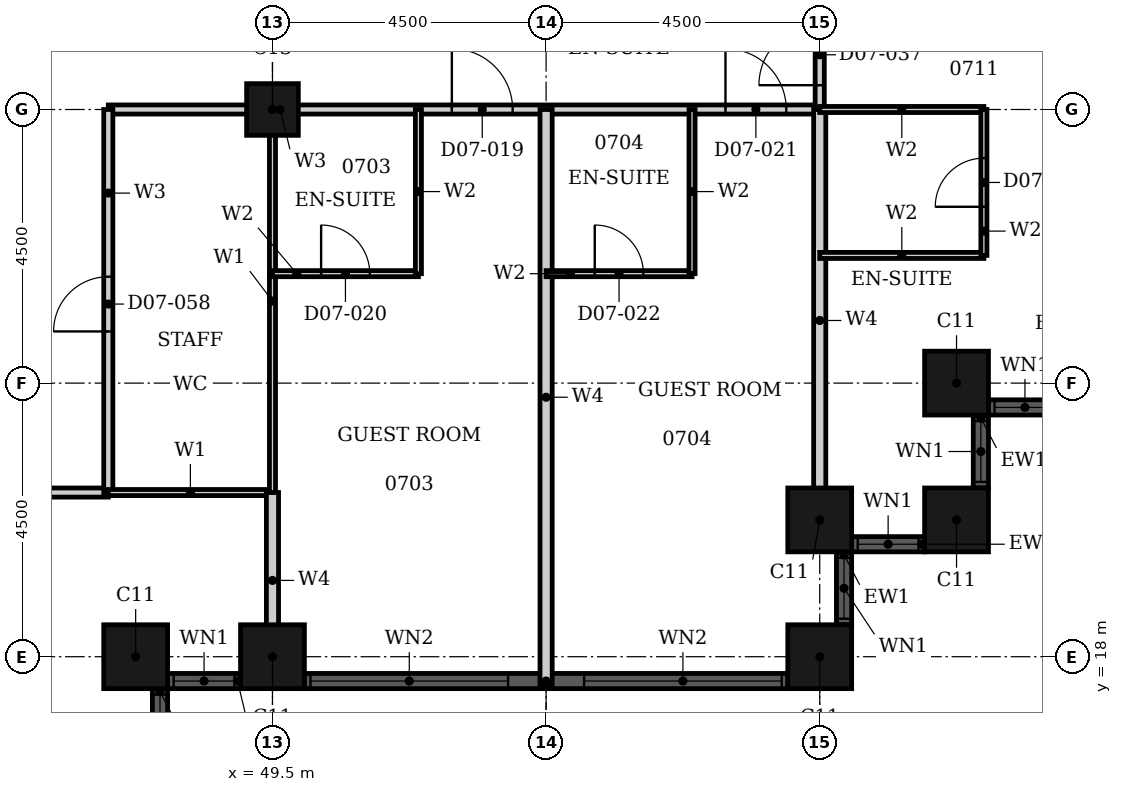
"""IFC4 building model, lengths in metres.
Left out: names, types, materials, properties, quantities, classifications, styles, units other than length and angle.
Written with IfcOpenShell. Run it as: python <this file> out.ifc"""

import sys

from ifc_helpers import new_model, si_unit, direction, frame, frame_2d, origin, origin_2d, place, context, subcontext, project, spatial, rectangle, hollow_rectangle, extrude, element, fill, save


model = new_model("IFC4")
c1 = context("Model", 3, precision=1e-05, world=origin(), true_north=direction((0.0, 1.0)))
c2 = subcontext(c1, "Body", "Model", "MODEL_VIEW")
j1 = project(units=[si_unit("LENGTHUNIT", "METRE"), si_unit("PLANEANGLEUNIT", "RADIAN")], contexts=[c1])
p1 = place(None, origin())
s1 = spatial("IfcSite", under=j1, at=p1, CompositionType="ELEMENT")
p2 = place(p1, origin())
s2 = spatial("IfcBuilding", under=s1, at=p2, CompositionType="ELEMENT")
p3 = place(p2, frame((0.0, 0.0, 37.2)))
s3 = spatial("IfcBuildingStorey", under=s2, at=p3, CompositionType="ELEMENT", Elevation=37.2)
for number, where, z_axis, x_axis in (
    (1, (47.25, 18.0, 0.0), (0.0, 0.0, 1.0), (1.0, 0.0, 0.0)),
    (2, (49.5, 18.0, 0.0), (0.0, 0.0, 1.0), (1.0, 0.0, 0.0)),
    (3, (58.5, 18.0, 0.0), (0.0, 0.0, 1.0), (1.0, 0.0, 0.0)),
    (4, (58.5, 20.25, 0.0), (0.0, 0.0, 1.0), (1.0, 0.0, 0.0)),
    (5, (60.75, 20.25, 0.0), (0.0, 0.0, 1.0), (1.0, 0.0, 0.0)),
    (6, (60.75, 22.5, 0.0), (0.0, 0.0, 1.0), (1.0, 0.0, 0.0)),
):
    element("IfcColumn", number, at=place(p3, frame(where, z_axis=z_axis, x_axis=x_axis)), inside=s3, PredefinedType="COLUMN", context=c2, shape_type="SweptSolid", body=[
        extrude(hollow_rectangle(XDim=1.05, YDim=1.05, WallThickness=0.034, at=origin_2d()), origin(), (0.0, 0.0, 1.0), 3.6),
    ])
p4 = place(p3, frame((49.5, 27.0, 0.0), z_axis=(0.0, 0.0, 1.0), x_axis=(1.0, 0.0, 0.0)))
e7 = element("IfcColumn", 7, at=p4, inside=s3, PredefinedType="COLUMN", context=c2, shape_type="SweptSolid", body=[
    extrude(hollow_rectangle(XDim=0.85, YDim=0.85, WallThickness=0.026, at=origin_2d()), origin(), (0.0, 0.0, 1.0), 3.6),
])
p5 = place(p3, frame((47.65, 16.275, 0.0), z_axis=(0.0, 0.0, 1.0), x_axis=(0.0, 1.0, 0.0)))
e8 = element("IfcWall", 8, at=p5, inside=s3, PredefinedType="SOLIDWALL", context=c2, shape_type="SweptSolid", body=[
    extrude(rectangle(XDim=1.2, YDim=0.25, at=frame_2d((0.6, 0.0))), origin(), (0.0, 0.0, 1.0), 3.6),
])
p6 = place(p5, frame((0.1, 0.0, 0.9)))
e9 = element("IfcOpeningElement", 9, at=p6, cuts=e8, PredefinedType="OPENING", context=c2, shape_type="SweptSolid", body=[
    extrude(rectangle(XDim=1.0, YDim=2.08, at=frame_2d((0.5, 1.04))), frame((0.0, 0.135, 0.0), z_axis=(0.0, -1.0, 0.0), x_axis=(1.0, 0.0, 0.0)), (0.0, 0.0, 1.0), 0.27),
])
p7 = place(p3, frame((47.775, 17.6, 0.0), z_axis=(0.0, 0.0, 1.0), x_axis=(1.0, 0.0, 0.0)))
e10 = element("IfcWall", 10, at=p7, inside=s3, PredefinedType="SOLIDWALL", context=c2, shape_type="SweptSolid", body=[
    extrude(rectangle(XDim=1.2, YDim=0.25, at=frame_2d((0.6, 0.0))), origin(), (0.0, 0.0, 1.0), 3.6),
])
p8 = place(p7, frame((0.1, 0.0, 0.9)))
e11 = element("IfcOpeningElement", 11, at=p8, cuts=e10, PredefinedType="OPENING", context=c2, shape_type="SweptSolid", body=[
    extrude(rectangle(XDim=1.0, YDim=2.08, at=frame_2d((0.5, 1.04))), frame((0.0, 0.135, 0.0), z_axis=(0.0, -1.0, 0.0), x_axis=(1.0, 0.0, 0.0)), (0.0, 0.0, 1.0), 0.27),
])
p9 = place(p3, frame((50.025, 17.6, 0.0), z_axis=(0.0, 0.0, 1.0), x_axis=(1.0, 0.0, 0.0)))
e12 = element("IfcWall", 12, at=p9, inside=s3, PredefinedType="SOLIDWALL", context=c2, shape_type="SweptSolid", body=[
    extrude(rectangle(XDim=7.95, YDim=0.25, at=frame_2d((3.975, 0.0))), origin(), (0.0, 0.0, 1.0), 3.6),
])
p10 = place(p9, frame((0.1, 0.0, 0.9)))
e13 = element("IfcOpeningElement", 13, at=p10, cuts=e12, PredefinedType="OPENING", context=c2, shape_type="SweptSolid", body=[
    extrude(rectangle(XDim=3.25, YDim=2.08, at=frame_2d((1.625, 1.04))), frame((0.0, 0.135, 0.0), z_axis=(0.0, -1.0, 0.0), x_axis=(1.0, 0.0, 0.0)), (0.0, 0.0, 1.0), 0.27),
])
p11 = place(p9, frame((4.6, 0.0, 0.9)))
e14 = element("IfcOpeningElement", 14, at=p11, cuts=e12, PredefinedType="OPENING", context=c2, shape_type="SweptSolid", body=[
    extrude(rectangle(XDim=3.25, YDim=2.08, at=frame_2d((1.625, 1.04))), frame((0.0, 0.135, 0.0), z_axis=(0.0, -1.0, 0.0), x_axis=(1.0, 0.0, 0.0)), (0.0, 0.0, 1.0), 0.27),
])
p12 = place(p3, frame((58.9, 18.525, 0.0), z_axis=(0.0, 0.0, 1.0), x_axis=(0.0, 1.0, 0.0)))
e15 = element("IfcWall", 15, at=p12, inside=s3, PredefinedType="SOLIDWALL", context=c2, shape_type="SweptSolid", body=[
    extrude(rectangle(XDim=1.2, YDim=0.25, at=frame_2d((0.6, 0.0))), origin(), (0.0, 0.0, 1.0), 3.6),
])
p13 = place(p12, frame((0.1, 0.0, 0.9)))
e16 = element("IfcOpeningElement", 16, at=p13, cuts=e15, PredefinedType="OPENING", context=c2, shape_type="SweptSolid", body=[
    extrude(rectangle(XDim=1.0, YDim=2.08, at=frame_2d((0.5, 1.04))), frame((0.0, 0.135, 0.0), z_axis=(0.0, -1.0, 0.0), x_axis=(1.0, 0.0, 0.0)), (0.0, 0.0, 1.0), 0.27),
])
p14 = place(p3, frame((59.025, 19.85, 0.0), z_axis=(0.0, 0.0, 1.0), x_axis=(1.0, 0.0, 0.0)))
e17 = element("IfcWall", 17, at=p14, inside=s3, PredefinedType="SOLIDWALL", context=c2, shape_type="SweptSolid", body=[
    extrude(rectangle(XDim=1.2, YDim=0.25, at=frame_2d((0.6, 0.0))), origin(), (0.0, 0.0, 1.0), 3.6),
])
p15 = place(p14, frame((0.1, 0.0, 0.9)))
e18 = element("IfcOpeningElement", 18, at=p15, cuts=e17, PredefinedType="OPENING", context=c2, shape_type="SweptSolid", body=[
    extrude(rectangle(XDim=1.0, YDim=2.08, at=frame_2d((0.5, 1.04))), frame((0.0, 0.135, 0.0), z_axis=(0.0, -1.0, 0.0), x_axis=(1.0, 0.0, 0.0)), (0.0, 0.0, 1.0), 0.27),
])
p16 = place(p3, frame((61.15, 20.775, 0.0), z_axis=(0.0, 0.0, 1.0), x_axis=(0.0, 1.0, 0.0)))
e19 = element("IfcWall", 19, at=p16, inside=s3, PredefinedType="SOLIDWALL", context=c2, shape_type="SweptSolid", body=[
    extrude(rectangle(XDim=1.2, YDim=0.25, at=frame_2d((0.6, 0.0))), origin(), (0.0, 0.0, 1.0), 3.6),
])
p17 = place(p16, frame((0.1, 0.0, 0.9)))
e20 = element("IfcOpeningElement", 20, at=p17, cuts=e19, PredefinedType="OPENING", context=c2, shape_type="SweptSolid", body=[
    extrude(rectangle(XDim=1.0, YDim=2.08, at=frame_2d((0.5, 1.04))), frame((0.0, 0.135, 0.0), z_axis=(0.0, -1.0, 0.0), x_axis=(1.0, 0.0, 0.0)), (0.0, 0.0, 1.0), 0.27),
])
p18 = place(p3, frame((61.275, 22.1, 0.0), z_axis=(0.0, 0.0, 1.0), x_axis=(1.0, 0.0, 0.0)))
e21 = element("IfcWall", 21, at=p18, inside=s3, PredefinedType="SOLIDWALL", context=c2, shape_type="SweptSolid", body=[
    extrude(rectangle(XDim=1.2, YDim=0.25, at=frame_2d((0.6, 0.0))), origin(), (0.0, 0.0, 1.0), 3.6),
])
p19 = place(p18, frame((0.1, 0.0, 0.9)))
e22 = element("IfcOpeningElement", 22, at=p19, cuts=e21, PredefinedType="OPENING", context=c2, shape_type="SweptSolid", body=[
    extrude(rectangle(XDim=1.0, YDim=2.08, at=frame_2d((0.5, 1.04))), frame((0.0, 0.135, 0.0), z_axis=(0.0, -1.0, 0.0), x_axis=(1.0, 0.0, 0.0)), (0.0, 0.0, 1.0), 0.27),
])
p20 = place(p3, frame((31.5, 20.7, 0.0), z_axis=(0.0, 0.0, 1.0), x_axis=(1.0, 0.0, 0.0)))
e23 = element("IfcWall", 23, at=p20, inside=s3, PredefinedType="PARTITIONING", context=c2, shape_type="SweptSolid", body=[
    extrude(rectangle(XDim=15.3, YDim=0.15, at=frame_2d((7.65, 0.0))), origin(), (0.0, 0.0, 1.0), 3.3),
])
p21 = place(p20, frame((11.95, 0.0, 0.0)))
e24 = element("IfcOpeningElement", 24, at=p21, cuts=e23, PredefinedType="OPENING", context=c2, shape_type="SweptSolid", body=[
    extrude(rectangle(XDim=1.0, YDim=2.1, at=frame_2d((0.5, 1.05))), frame((0.0, 0.085, 0.0), z_axis=(0.0, -1.0, 0.0), x_axis=(1.0, 0.0, 0.0)), (0.0, 0.0, 1.0), 0.17),
])
p22 = place(p20, frame((1.05, 0.0, 0.0)))
e25 = element("IfcOpeningElement", 25, at=p22, cuts=e23, PredefinedType="OPENING", context=c2, shape_type="SweptSolid", body=[
    extrude(rectangle(XDim=0.9, YDim=2.1, at=frame_2d((0.45, 1.05))), frame((0.0, 0.085, 0.0), z_axis=(0.0, -1.0, 0.0), x_axis=(1.0, 0.0, 0.0)), (0.0, 0.0, 1.0), 0.17),
])
p23 = place(p20, frame((5.55, 0.0, 0.0)))
e26 = element("IfcOpeningElement", 26, at=p23, cuts=e23, PredefinedType="OPENING", context=c2, shape_type="SweptSolid", body=[
    extrude(rectangle(XDim=0.9, YDim=2.1, at=frame_2d((0.45, 1.05))), frame((0.0, 0.085, 0.0), z_axis=(0.0, -1.0, 0.0), x_axis=(1.0, 0.0, 0.0)), (0.0, 0.0, 1.0), 0.17),
])
p24 = place(p3, frame((46.8, 27.0, 0.0), z_axis=(0.0, 0.0, 1.0), x_axis=(1.0, 0.0, 0.0)))
e27 = element("IfcWall", 27, at=p24, inside=s3, PredefinedType="PARTITIONING", context=c2, shape_type="SweptSolid", body=[
    extrude(rectangle(XDim=11.7, YDim=0.15, at=frame_2d((5.85, 0.0))), origin(), (0.0, 0.0, 1.0), 2.58),
])
p25 = place(p24, frame((5.65, 0.0, 0.0)))
e28 = element("IfcOpeningElement", 28, at=p25, cuts=e27, PredefinedType="OPENING", context=c2, shape_type="SweptSolid", body=[
    extrude(rectangle(XDim=1.0, YDim=2.1, at=frame_2d((0.5, 1.05))), frame((0.0, 0.085, 0.0), z_axis=(0.0, -1.0, 0.0), x_axis=(1.0, 0.0, 0.0)), (0.0, 0.0, 1.0), 0.17),
])
p26 = place(p24, frame((10.15, 0.0, 0.0)))
e29 = element("IfcOpeningElement", 29, at=p26, cuts=e27, PredefinedType="OPENING", context=c2, shape_type="SweptSolid", body=[
    extrude(rectangle(XDim=1.0, YDim=2.1, at=frame_2d((0.5, 1.05))), frame((0.0, 0.085, 0.0), z_axis=(0.0, -1.0, 0.0), x_axis=(1.0, 0.0, 0.0)), (0.0, 0.0, 1.0), 0.17),
])
p27 = place(p3, frame((46.8, 20.7, 0.0), z_axis=(0.0, 0.0, 1.0), x_axis=(0.0, 1.0, 0.0)))
e30 = element("IfcWall", 30, at=p27, inside=s3, PredefinedType="PARTITIONING", context=c2, shape_type="SweptSolid", body=[
    extrude(rectangle(XDim=6.3, YDim=0.15, at=frame_2d((3.15, 0.0))), origin(), (0.0, 0.0, 1.0), 3.3),
])
p28 = place(p27, frame((2.65, 0.0, 0.0)))
e31 = element("IfcOpeningElement", 31, at=p28, cuts=e30, PredefinedType="OPENING", context=c2, shape_type="SweptSolid", body=[
    extrude(rectangle(XDim=0.9, YDim=2.1, at=frame_2d((0.45, 1.05))), frame((0.0, 0.085, 0.0), z_axis=(0.0, -1.0, 0.0), x_axis=(1.0, 0.0, 0.0)), (0.0, 0.0, 1.0), 0.17),
])
p29 = place(p3, frame((58.5, 27.0, 0.0), z_axis=(0.0, 0.0, 1.0), x_axis=(0.0, 1.0, 0.0)))
e32 = element("IfcWall", 32, at=p29, inside=s3, PredefinedType="PARTITIONING", context=c2, shape_type="SweptSolid", body=[
    extrude(rectangle(XDim=1.8, YDim=0.15, at=frame_2d((0.9, 0.0))), origin(), (0.0, 0.0, 1.0), 3.3),
])
p30 = place(p29, frame((0.4, 0.0, 0.0)))
e33 = element("IfcOpeningElement", 33, at=p30, cuts=e32, PredefinedType="OPENING", context=c2, shape_type="SweptSolid", body=[
    extrude(rectangle(XDim=1.0, YDim=2.1, at=frame_2d((0.5, 1.05))), frame((0.0, 0.085, 0.0), z_axis=(0.0, -1.0, 0.0), x_axis=(1.0, 0.0, 0.0)), (0.0, 0.0, 1.0), 0.17),
])
p31 = place(p3, frame((46.8, 20.7, 0.0), z_axis=(0.0, 0.0, 1.0), x_axis=(1.0, 0.0, 0.0)))
e34 = element("IfcWall", 34, at=p31, inside=s3, PredefinedType="PARTITIONING", context=c2, shape_type="SweptSolid", body=[
    extrude(rectangle(XDim=2.7, YDim=0.1, at=frame_2d((1.35, 0.0))), origin(), (0.0, 0.0, 1.0), 3.3),
])
p32 = place(p3, frame((49.5, 20.7, 0.0), z_axis=(0.0, 0.0, 1.0), x_axis=(0.0, 1.0, 0.0)))
e35 = element("IfcWall", 35, at=p32, inside=s3, PredefinedType="PARTITIONING", context=c2, shape_type="SweptSolid", body=[
    extrude(rectangle(XDim=6.3, YDim=0.1, at=frame_2d((3.15, 0.0))), origin(), (0.0, 0.0, 1.0), 2.38),
])
p33 = place(p3, frame((49.5, 17.81, 0.0), z_axis=(0.0, 0.0, 1.0), x_axis=(0.0, 1.0, 0.0)))
e36 = element("IfcWall", 36, at=p33, inside=s3, PredefinedType="PARTITIONING", context=c2, shape_type="SweptSolid", body=[
    extrude(rectangle(XDim=2.89, YDim=0.2, at=frame_2d((1.445, 0.0))), origin(), (0.0, 0.0, 1.0), 2.38),
])
p34 = place(p3, frame((54.0, 17.535, 0.0), z_axis=(0.0, 0.0, 1.0), x_axis=(0.0, 1.0, 0.0)))
e37 = element("IfcWall", 37, at=p34, inside=s3, PredefinedType="PARTITIONING", context=c2, shape_type="SweptSolid", body=[
    extrude(rectangle(XDim=9.465, YDim=0.2, at=frame_2d((4.732, 0.0))), origin(), (0.0, 0.0, 1.0), 3.3),
])
p35 = place(p3, frame((58.5, 20.06, 0.0), z_axis=(0.0, 0.0, 1.0), x_axis=(0.0, 1.0, 0.0)))
e38 = element("IfcWall", 38, at=p35, inside=s3, PredefinedType="PARTITIONING", context=c2, shape_type="SweptSolid", body=[
    extrude(rectangle(XDim=6.94, YDim=0.2, at=frame_2d((3.47, 0.0))), origin(), (0.0, 0.0, 1.0), 3.3),
])
p36 = place(p3, frame((49.5, 24.3, 0.0), z_axis=(0.0, 0.0, 1.0), x_axis=(1.0, 0.0, 0.0)))
e39 = element("IfcWall", 39, at=p36, inside=s3, PredefinedType="PARTITIONING", context=c2, shape_type="SweptSolid", body=[
    extrude(rectangle(XDim=2.4, YDim=0.1, at=frame_2d((1.2, 0.0))), origin(), (0.0, 0.0, 1.0), 3.3),
])
p37 = place(p36, frame((0.8, 0.0, 0.0)))
e40 = element("IfcOpeningElement", 40, at=p37, cuts=e39, PredefinedType="OPENING", context=c2, shape_type="SweptSolid", body=[
    extrude(rectangle(XDim=0.8, YDim=2.1, at=frame_2d((0.4, 1.05))), frame((0.0, 0.06, 0.0), z_axis=(0.0, -1.0, 0.0), x_axis=(1.0, 0.0, 0.0)), (0.0, 0.0, 1.0), 0.12),
])
p38 = place(p3, frame((54.0, 24.3, 0.0), z_axis=(0.0, 0.0, 1.0), x_axis=(1.0, 0.0, 0.0)))
e41 = element("IfcWall", 41, at=p38, inside=s3, PredefinedType="PARTITIONING", context=c2, shape_type="SweptSolid", body=[
    extrude(rectangle(XDim=2.4, YDim=0.1, at=frame_2d((1.2, 0.0))), origin(), (0.0, 0.0, 1.0), 3.3),
])
p39 = place(p38, frame((0.8, 0.0, 0.0)))
e42 = element("IfcOpeningElement", 42, at=p39, cuts=e41, PredefinedType="OPENING", context=c2, shape_type="SweptSolid", body=[
    extrude(rectangle(XDim=0.8, YDim=2.1, at=frame_2d((0.4, 1.05))), frame((0.0, 0.06, 0.0), z_axis=(0.0, -1.0, 0.0), x_axis=(1.0, 0.0, 0.0)), (0.0, 0.0, 1.0), 0.12),
])
p40 = place(p3, frame((58.5, 24.6, 0.0), z_axis=(0.0, 0.0, 1.0), x_axis=(1.0, 0.0, 0.0)))
e43 = element("IfcWall", 43, at=p40, inside=s3, PredefinedType="PARTITIONING", context=c2, shape_type="SweptSolid", body=[
    extrude(rectangle(XDim=2.7, YDim=0.1, at=frame_2d((1.35, 0.0))), origin(), (0.0, 0.0, 1.0), 3.3),
])
p41 = place(p3, frame((58.5, 27.0, 0.0), z_axis=(0.0, 0.0, 1.0), x_axis=(1.0, 0.0, 0.0)))
e44 = element("IfcWall", 44, at=p41, inside=s3, PredefinedType="PARTITIONING", context=c2, shape_type="SweptSolid", body=[
    extrude(rectangle(XDim=2.7, YDim=0.1, at=frame_2d((1.35, 0.0))), origin(), (0.0, 0.0, 1.0), 2.58),
])
for number, where, z_axis, x_axis in (
    (45, (51.9, 24.3, 0.0), (0.0, 0.0, 1.0), (0.0, 1.0, 0.0)),
    (46, (56.4, 24.3, 0.0), (0.0, 0.0, 1.0), (0.0, 1.0, 0.0)),
):
    element("IfcWall", number, at=place(p3, frame(where, z_axis=z_axis, x_axis=x_axis)), inside=s3, PredefinedType="PARTITIONING", context=c2, shape_type="SweptSolid", body=[
        extrude(rectangle(XDim=2.7, YDim=0.1, at=frame_2d((1.35, 0.0))), origin(), (0.0, 0.0, 1.0), 3.3),
    ])
p42 = place(p3, frame((61.2, 24.6, 0.0), z_axis=(0.0, 0.0, 1.0), x_axis=(0.0, 1.0, 0.0)))
e47 = element("IfcWall", 47, at=p42, inside=s3, PredefinedType="PARTITIONING", context=c2, shape_type="SweptSolid", body=[
    extrude(rectangle(XDim=2.4, YDim=0.1, at=frame_2d((1.2, 0.0))), origin(), (0.0, 0.0, 1.0), 3.3),
])
p43 = place(p42, frame((0.8, 0.0, 0.0)))
e48 = element("IfcOpeningElement", 48, at=p43, cuts=e47, PredefinedType="OPENING", context=c2, shape_type="SweptSolid", body=[
    extrude(rectangle(XDim=0.8, YDim=2.1, at=frame_2d((0.4, 1.05))), frame((0.0, 0.06, 0.0), z_axis=(0.0, -1.0, 0.0), x_axis=(1.0, 0.0, 0.0)), (0.0, 0.0, 1.0), 0.12),
])
p44 = place(p6, origin())
e49 = element("IfcWindow", 49, at=p44, inside=s3, PartitioningType="SINGLE_PANEL", PredefinedType="WINDOW", context=c2, shape_type="SweptSolid", body=[
    extrude(rectangle(XDim=1.0, YDim=2.08, at=frame_2d((0.5, 1.04))), frame((0.0, 0.03, 0.0), z_axis=(0.0, -1.0, 0.0), x_axis=(1.0, 0.0, 0.0)), (0.0, 0.0, 1.0), 0.06),
])
fill(e9, e49)
p45 = place(p8, origin())
e50 = element("IfcWindow", 50, at=p45, inside=s3, PartitioningType="SINGLE_PANEL", PredefinedType="WINDOW", context=c2, shape_type="SweptSolid", body=[
    extrude(rectangle(XDim=1.0, YDim=2.08, at=frame_2d((0.5, 1.04))), frame((0.0, 0.03, 0.0), z_axis=(0.0, -1.0, 0.0), x_axis=(1.0, 0.0, 0.0)), (0.0, 0.0, 1.0), 0.06),
])
fill(e11, e50)
p46 = place(p10, origin())
e51 = element("IfcWindow", 51, at=p46, inside=s3, PartitioningType="SINGLE_PANEL", PredefinedType="WINDOW", context=c2, shape_type="SweptSolid", body=[
    extrude(rectangle(XDim=3.25, YDim=2.08, at=frame_2d((1.625, 1.04))), frame((0.0, 0.03, 0.0), z_axis=(0.0, -1.0, 0.0), x_axis=(1.0, 0.0, 0.0)), (0.0, 0.0, 1.0), 0.06),
])
fill(e13, e51)
p47 = place(p11, origin())
e52 = element("IfcWindow", 52, at=p47, inside=s3, PartitioningType="SINGLE_PANEL", PredefinedType="WINDOW", context=c2, shape_type="SweptSolid", body=[
    extrude(rectangle(XDim=3.25, YDim=2.08, at=frame_2d((1.625, 1.04))), frame((0.0, 0.03, 0.0), z_axis=(0.0, -1.0, 0.0), x_axis=(1.0, 0.0, 0.0)), (0.0, 0.0, 1.0), 0.06),
])
fill(e14, e52)
p48 = place(p13, origin())
e53 = element("IfcWindow", 53, at=p48, inside=s3, PartitioningType="SINGLE_PANEL", PredefinedType="WINDOW", context=c2, shape_type="SweptSolid", body=[
    extrude(rectangle(XDim=1.0, YDim=2.08, at=frame_2d((0.5, 1.04))), frame((0.0, 0.03, 0.0), z_axis=(0.0, -1.0, 0.0), x_axis=(1.0, 0.0, 0.0)), (0.0, 0.0, 1.0), 0.06),
])
fill(e16, e53)
p49 = place(p15, origin())
e54 = element("IfcWindow", 54, at=p49, inside=s3, PartitioningType="SINGLE_PANEL", PredefinedType="WINDOW", context=c2, shape_type="SweptSolid", body=[
    extrude(rectangle(XDim=1.0, YDim=2.08, at=frame_2d((0.5, 1.04))), frame((0.0, 0.03, 0.0), z_axis=(0.0, -1.0, 0.0), x_axis=(1.0, 0.0, 0.0)), (0.0, 0.0, 1.0), 0.06),
])
fill(e18, e54)
p50 = place(p17, origin())
e55 = element("IfcWindow", 55, at=p50, inside=s3, PartitioningType="SINGLE_PANEL", PredefinedType="WINDOW", context=c2, shape_type="SweptSolid", body=[
    extrude(rectangle(XDim=1.0, YDim=2.08, at=frame_2d((0.5, 1.04))), frame((0.0, 0.03, 0.0), z_axis=(0.0, -1.0, 0.0), x_axis=(1.0, 0.0, 0.0)), (0.0, 0.0, 1.0), 0.06),
])
fill(e20, e55)
p51 = place(p19, origin())
e56 = element("IfcWindow", 56, at=p51, inside=s3, PartitioningType="SINGLE_PANEL", PredefinedType="WINDOW", context=c2, shape_type="SweptSolid", body=[
    extrude(rectangle(XDim=1.0, YDim=2.08, at=frame_2d((0.5, 1.04))), frame((0.0, 0.03, 0.0), z_axis=(0.0, -1.0, 0.0), x_axis=(1.0, 0.0, 0.0)), (0.0, 0.0, 1.0), 0.06),
])
fill(e22, e56)
p52 = place(p25, origin())
e57 = element("IfcDoor", 57, at=p52, inside=s3, OperationType="SINGLE_SWING_RIGHT", PredefinedType="DOOR", context=c2, shape_type="SweptSolid", body=[
    extrude(rectangle(XDim=1.0, YDim=2.1, at=frame_2d((0.5, 1.05))), frame((0.0, 0.025, 0.0), z_axis=(0.0, -1.0, 0.0), x_axis=(1.0, 0.0, 0.0)), (0.0, 0.0, 1.0), 0.05),
])
fill(e28, e57)
p53 = place(p37, origin())
e58 = element("IfcDoor", 58, at=p53, inside=s3, OperationType="SINGLE_SWING_RIGHT", PredefinedType="DOOR", context=c2, shape_type="SweptSolid", body=[
    extrude(rectangle(XDim=0.8, YDim=2.1, at=frame_2d((0.4, 1.05))), frame((0.0, 0.025, 0.0), z_axis=(0.0, -1.0, 0.0), x_axis=(1.0, 0.0, 0.0)), (0.0, 0.0, 1.0), 0.05),
])
fill(e40, e58)
p54 = place(p26, origin())
e59 = element("IfcDoor", 59, at=p54, inside=s3, OperationType="SINGLE_SWING_RIGHT", PredefinedType="DOOR", context=c2, shape_type="SweptSolid", body=[
    extrude(rectangle(XDim=1.0, YDim=2.1, at=frame_2d((0.5, 1.05))), frame((0.0, 0.025, 0.0), z_axis=(0.0, -1.0, 0.0), x_axis=(1.0, 0.0, 0.0)), (0.0, 0.0, 1.0), 0.05),
])
fill(e29, e59)
p55 = place(p39, origin())
e60 = element("IfcDoor", 60, at=p55, inside=s3, OperationType="SINGLE_SWING_RIGHT", PredefinedType="DOOR", context=c2, shape_type="SweptSolid", body=[
    extrude(rectangle(XDim=0.8, YDim=2.1, at=frame_2d((0.4, 1.05))), frame((0.0, 0.025, 0.0), z_axis=(0.0, -1.0, 0.0), x_axis=(1.0, 0.0, 0.0)), (0.0, 0.0, 1.0), 0.05),
])
fill(e42, e60)
p56 = place(p30, origin())
e61 = element("IfcDoor", 61, at=p56, inside=s3, OperationType="SINGLE_SWING_LEFT", PredefinedType="DOOR", context=c2, shape_type="SweptSolid", body=[
    extrude(rectangle(XDim=1.0, YDim=2.1, at=frame_2d((0.5, 1.05))), frame((0.0, 0.025, 0.0), z_axis=(0.0, -1.0, 0.0), x_axis=(1.0, 0.0, 0.0)), (0.0, 0.0, 1.0), 0.05),
])
fill(e33, e61)
p57 = place(p43, origin())
e62 = element("IfcDoor", 62, at=p57, inside=s3, OperationType="SINGLE_SWING_RIGHT", PredefinedType="DOOR", context=c2, shape_type="SweptSolid", body=[
    extrude(rectangle(XDim=0.8, YDim=2.1, at=frame_2d((0.4, 1.05))), frame((0.0, 0.025, 0.0), z_axis=(0.0, -1.0, 0.0), x_axis=(1.0, 0.0, 0.0)), (0.0, 0.0, 1.0), 0.05),
])
fill(e48, e62)
p58 = place(p28, origin())
e63 = element("IfcDoor", 63, at=p58, inside=s3, OperationType="SINGLE_SWING_RIGHT", PredefinedType="DOOR", context=c2, shape_type="SweptSolid", body=[
    extrude(rectangle(XDim=0.9, YDim=2.1, at=frame_2d((0.45, 1.05))), frame((0.0, 0.025, 0.0), z_axis=(0.0, -1.0, 0.0), x_axis=(1.0, 0.0, 0.0)), (0.0, 0.0, 1.0), 0.05),
])
fill(e31, e63)
save(model, sys.argv[1])
